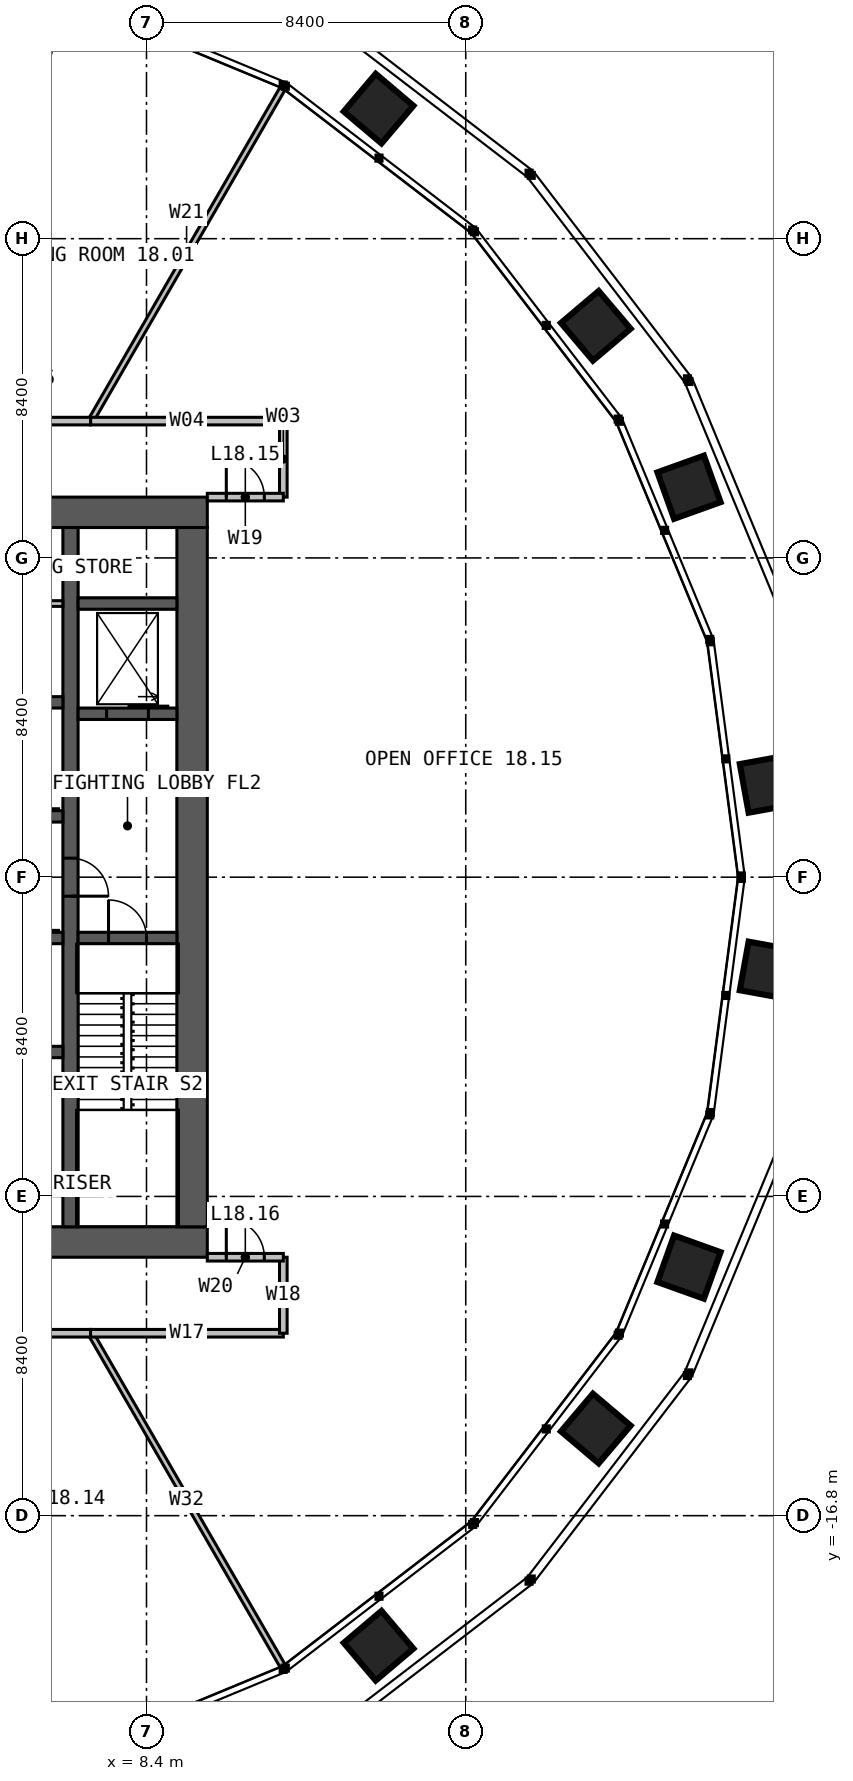
"""IFC4 building model, lengths in metres.
Left out: names, types, materials, properties, quantities, classifications, styles, units other than length and angle.
Written with IfcOpenShell. Run it as: python <this file> out.ifc"""

import sys

from ifc_helpers import new_model, si_unit, direction, frame, frame_2d, origin, place, context, subcontext, project, spatial, rectangle, extrude, element, fill, save


model = new_model("IFC4")
c1 = context("Model", 3, precision=1e-05, world=origin(), true_north=direction((0.0, 1.0)))
c2 = subcontext(c1, "Body", "Model", "MODEL_VIEW")
j1 = project(units=[si_unit("LENGTHUNIT", "METRE"), si_unit("PLANEANGLEUNIT", "RADIAN")], contexts=[c1])
p1 = place(None, origin())
s1 = spatial("IfcSite", under=j1, at=p1, CompositionType="ELEMENT")
p2 = place(p1, origin())
s2 = spatial("IfcBuilding", under=s1, at=p2, CompositionType="ELEMENT")
p3 = place(p2, frame((0.0, 0.0, 77.0)))
s3 = spatial("IfcBuildingStorey", under=s2, at=p3, CompositionType="ELEMENT", Elevation=77.0)
p4 = place(p3, frame((-10.0, 9.6, 0.0), z_axis=(0.0, 0.0, 1.0), x_axis=(1.0, 0.0, 0.0)))
e1 = element("IfcWall", 1, at=p4, inside=s3, PredefinedType="SOLIDWALL", context=c2, shape_type="SweptSolid", body=[
    extrude(rectangle(XDim=20.0, YDim=0.8, at=frame_2d((10.0, 0.0))), origin(), (0.0, 0.0, 1.0), 4.0),
])
p5 = place(p4, frame((9.4, 0.0, 0.0)))
e2 = element("IfcOpeningElement", 2, at=p5, cuts=e1, PredefinedType="OPENING", context=c2, shape_type="SweptSolid", body=[
    extrude(rectangle(XDim=1.2, YDim=2.2, at=frame_2d((0.6, 1.1))), frame((0.0, 0.41, 0.0), z_axis=(0.0, -1.0, 0.0), x_axis=(1.0, 0.0, 0.0)), (0.0, 0.0, 1.0), 0.82),
])
p6 = place(p3, frame((10.0, -9.6, 0.0), z_axis=(0.0, 0.0, 1.0), x_axis=(-1.0, 0.0, 0.0)))
e3 = element("IfcWall", 3, at=p6, inside=s3, PredefinedType="SOLIDWALL", context=c2, shape_type="SweptSolid", body=[
    extrude(rectangle(XDim=20.0, YDim=0.8, at=frame_2d((10.0, 0.0))), origin(), (0.0, 0.0, 1.0), 4.0),
])
p7 = place(p6, frame((6.875, 0.0, 0.0)))
e4 = element("IfcOpeningElement", 4, at=p7, cuts=e3, PredefinedType="OPENING", context=c2, shape_type="SweptSolid", body=[
    extrude(rectangle(XDim=1.2, YDim=2.2, at=frame_2d((0.6, 1.1))), frame((0.0, 0.41, 0.0), z_axis=(0.0, -1.0, 0.0), x_axis=(1.0, 0.0, 0.0)), (0.0, 0.0, 1.0), 0.82),
])
p8 = place(p3, frame((9.6, -9.2, 0.0), z_axis=(0.0, 0.0, 1.0), x_axis=(0.0, 1.0, 0.0)))
e5 = element("IfcWall", 5, at=p8, inside=s3, PredefinedType="SOLIDWALL", context=c2, shape_type="SweptSolid", body=[
    extrude(rectangle(XDim=18.4, YDim=0.8, at=frame_2d((9.2, 0.0))), origin(), (0.0, 0.0, 1.0), 4.0),
])
p9 = place(p3, frame((6.4, 9.2, 0.0), z_axis=(0.0, 0.0, 1.0), x_axis=(0.0, -1.0, 0.0)))
e6 = element("IfcWall", 6, at=p9, inside=s3, PredefinedType="SOLIDWALL", context=c2, shape_type="SweptSolid", body=[
    extrude(rectangle(XDim=18.4, YDim=0.4, at=frame_2d((9.2, 0.0))), origin(), (0.0, 0.0, 1.0), 4.0),
])
p10 = place(p9, frame((8.7, 0.0, 0.0)))
e7 = element("IfcOpeningElement", 7, at=p10, cuts=e6, PredefinedType="OPENING", context=c2, shape_type="SweptSolid", body=[
    extrude(rectangle(XDim=1.0, YDim=2.2, at=frame_2d((0.5, 1.1))), frame((0.0, 0.21, 0.0), z_axis=(0.0, -1.0, 0.0), x_axis=(1.0, 0.0, 0.0)), (0.0, 0.0, 1.0), 0.42),
])
p11 = place(p3, frame((1.35, 1.6, 0.0), z_axis=(0.0, 0.0, 1.0), x_axis=(1.0, 0.0, 0.0)))
e8 = element("IfcWall", 8, at=p11, inside=s3, PredefinedType="SOLIDWALL", context=c2, shape_type="SweptSolid", body=[
    extrude(rectangle(XDim=4.85, YDim=0.3, at=frame_2d((2.425, 0.0))), origin(), (0.0, 0.0, 1.0), 4.0),
])
p12 = place(p11, frame((0.6, 0.0, 0.0)))
e9 = element("IfcOpeningElement", 9, at=p12, cuts=e8, PredefinedType="OPENING", context=c2, shape_type="SweptSolid", body=[
    extrude(rectangle(XDim=1.1, YDim=2.2, at=frame_2d((0.55, 1.1))), frame((0.0, 0.16, 0.0), z_axis=(0.0, -1.0, 0.0), x_axis=(1.0, 0.0, 0.0)), (0.0, 0.0, 1.0), 0.32),
])
p13 = place(p11, frame((3.125, 0.0, 0.0)))
e10 = element("IfcOpeningElement", 10, at=p13, cuts=e8, PredefinedType="OPENING", context=c2, shape_type="SweptSolid", body=[
    extrude(rectangle(XDim=1.1, YDim=2.2, at=frame_2d((0.55, 1.1))), frame((0.0, 0.16, 0.0), z_axis=(0.0, -1.0, 0.0), x_axis=(1.0, 0.0, 0.0)), (0.0, 0.0, 1.0), 0.32),
])
p14 = place(p3, frame((1.35, 4.6, 0.0), z_axis=(0.0, 0.0, 1.0), x_axis=(1.0, 0.0, 0.0)))
e11 = element("IfcWall", 11, at=p14, inside=s3, PredefinedType="SOLIDWALL", context=c2, shape_type="SweptSolid", body=[
    extrude(rectangle(XDim=4.85, YDim=0.3, at=frame_2d((2.425, 0.0))), origin(), (0.0, 0.0, 1.0), 4.0),
])
p15 = place(p3, frame((3.85, -1.6, 0.0), z_axis=(0.0, 0.0, 1.0), x_axis=(1.0, 0.0, 0.0)))
e12 = element("IfcWall", 12, at=p15, inside=s3, PredefinedType="SOLIDWALL", context=c2, shape_type="SweptSolid", body=[
    extrude(rectangle(XDim=2.35, YDim=0.3, at=frame_2d((1.175, 0.0))), origin(), (0.0, 0.0, 1.0), 4.0),
])
p16 = place(p15, frame((0.625, 0.0, 0.0)))
e13 = element("IfcOpeningElement", 13, at=p16, cuts=e12, PredefinedType="OPENING", context=c2, shape_type="SweptSolid", body=[
    extrude(rectangle(XDim=1.1, YDim=2.2, at=frame_2d((0.55, 1.1))), frame((0.0, 0.16, 0.0), z_axis=(0.0, -1.0, 0.0), x_axis=(1.0, 0.0, 0.0)), (0.0, 0.0, 1.0), 0.32),
])
p17 = place(p3, frame((3.85, -4.6, 0.0), z_axis=(0.0, 0.0, 1.0), x_axis=(1.0, 0.0, 0.0)))
e14 = element("IfcWall", 14, at=p17, inside=s3, PredefinedType="SOLIDWALL", context=c2, shape_type="SweptSolid", body=[
    extrude(rectangle(XDim=2.35, YDim=0.3, at=frame_2d((1.175, 0.0))), origin(), (0.0, 0.0, 1.0), 4.0),
])
p18 = place(p3, frame((6.6, -1.6, 0.0), z_axis=(0.0, 0.0, 1.0), x_axis=(1.0, 0.0, 0.0)))
e15 = element("IfcWall", 15, at=p18, inside=s3, PredefinedType="SOLIDWALL", context=c2, shape_type="SweptSolid", body=[
    extrude(rectangle(XDim=2.6, YDim=0.3, at=frame_2d((1.3, 0.0))), origin(), (0.0, 0.0, 1.0), 4.0),
])
p19 = place(p18, frame((0.8, 0.0, 0.0)))
e16 = element("IfcOpeningElement", 16, at=p19, cuts=e15, PredefinedType="OPENING", context=c2, shape_type="SweptSolid", body=[
    extrude(rectangle(XDim=1.0, YDim=2.2, at=frame_2d((0.5, 1.1))), frame((0.0, 0.16, 0.0), z_axis=(0.0, -1.0, 0.0), x_axis=(1.0, 0.0, 0.0)), (0.0, 0.0, 1.0), 0.32),
])
p20 = place(p3, frame((6.6, 4.3, 0.0), z_axis=(0.0, 0.0, 1.0), x_axis=(1.0, 0.0, 0.0)))
e17 = element("IfcWall", 17, at=p20, inside=s3, PredefinedType="SOLIDWALL", context=c2, shape_type="SweptSolid", body=[
    extrude(rectangle(XDim=2.6, YDim=0.3, at=frame_2d((1.3, 0.0))), origin(), (0.0, 0.0, 1.0), 4.0),
])
p21 = place(p20, frame((0.75, 0.0, 0.0)))
e18 = element("IfcOpeningElement", 18, at=p21, cuts=e17, PredefinedType="OPENING", context=c2, shape_type="SweptSolid", body=[
    extrude(rectangle(XDim=1.1, YDim=2.2, at=frame_2d((0.55, 1.1))), frame((0.0, 0.16, 0.0), z_axis=(0.0, -1.0, 0.0), x_axis=(1.0, 0.0, 0.0)), (0.0, 0.0, 1.0), 0.32),
])
p22 = place(p3, frame((6.6, 7.2, 0.0), z_axis=(0.0, 0.0, 1.0), x_axis=(1.0, 0.0, 0.0)))
e19 = element("IfcWall", 19, at=p22, inside=s3, PredefinedType="SOLIDWALL", context=c2, shape_type="SweptSolid", body=[
    extrude(rectangle(XDim=2.6, YDim=0.3, at=frame_2d((1.3, 0.0))), origin(), (0.0, 0.0, 1.0), 4.0),
])
p23 = place(p3, frame((1.35, 7.2, 0.0), z_axis=(0.0, 0.0, 1.0), x_axis=(1.0, 0.0, 0.0)))
e20 = element("IfcWall", 20, at=p23, inside=s3, PredefinedType="PARTITIONING", context=c2, shape_type="SweptSolid", body=[
    extrude(rectangle(XDim=4.85, YDim=0.15, at=frame_2d((2.425, 0.0))), origin(), (0.0, 0.0, 1.0), 3.75),
])
p24 = place(p23, frame((3.45, 0.0, 0.0)))
e21 = element("IfcOpeningElement", 21, at=p24, cuts=e20, PredefinedType="OPENING", context=c2, shape_type="SweptSolid", body=[
    extrude(rectangle(XDim=0.9, YDim=2.2, at=frame_2d((0.45, 1.1))), frame((0.0, 0.085, 0.0), z_axis=(0.0, -1.0, 0.0), x_axis=(1.0, 0.0, 0.0)), (0.0, 0.0, 1.0), 0.17),
])
p25 = place(p3, frame((6.928, 12.0, 0.0), z_axis=(0.0, 0.0, 1.0), x_axis=(0.500002673408, 0.866023860286, 0.0)))
e22 = element("IfcWall", 22, at=p25, inside=s3, PredefinedType="PARTITIONING", context=c2, shape_type="SweptSolid", body=[
    extrude(rectangle(XDim=10.106, YDim=0.15, at=frame_2d((5.053, 0.0))), origin(), (0.0, 0.0, 1.0), 2.79),
])
p26 = place(p3, frame((3.215, 12.0, 0.0), z_axis=(0.0, 0.0, 1.0), x_axis=(0.258825273624, 0.96592415734, 0.0)))
e23 = element("IfcWall", 23, at=p26, inside=s3, PredefinedType="PARTITIONING", context=c2, shape_type="SweptSolid", body=[
    extrude(rectangle(XDim=11.539, YDim=0.15, at=frame_2d((5.77, 0.0))), origin(), (0.0, 0.0, 1.0), 2.79),
])
p27 = place(p3, frame((6.928, -12.0, 0.0), z_axis=(0.0, 0.0, 1.0), x_axis=(0.500002673408, -0.866023860286, 0.0)))
e24 = element("IfcWall", 24, at=p27, inside=s3, PredefinedType="PARTITIONING", context=c2, shape_type="SweptSolid", body=[
    extrude(rectangle(XDim=10.106, YDim=0.15, at=frame_2d((5.053, 0.0))), origin(), (0.0, 0.0, 1.0), 2.79),
])
p28 = place(p3, frame((12.0, 10.0, 0.0), z_axis=(0.0, 0.0, 1.0), x_axis=(0.0, 1.0, 0.0)))
e25 = element("IfcWall", 25, at=p28, inside=s3, PredefinedType="PARTITIONING", context=c2, shape_type="SweptSolid", body=[
    extrude(rectangle(XDim=2.0, YDim=0.2, at=frame_2d((1.0, 0.0))), origin(), (0.0, 0.0, 1.0), 3.8),
])
p29 = place(p3, frame((12.0, 12.0, 0.0), z_axis=(0.0, 0.0, 1.0), x_axis=(-1.0, 0.0, 0.0)))
e26 = element("IfcWall", 26, at=p29, inside=s3, PredefinedType="PARTITIONING", context=c2, shape_type="SweptSolid", body=[
    extrude(rectangle(XDim=5.072, YDim=0.2, at=frame_2d((2.536, 0.0))), origin(), (0.0, 0.0, 1.0), 3.8),
])
p30 = place(p3, frame((6.928, 12.0, 0.0), z_axis=(0.0, 0.0, 1.0), x_axis=(-1.0, 0.0, 0.0)))
e27 = element("IfcWall", 27, at=p30, inside=s3, PredefinedType="PARTITIONING", context=c2, shape_type="SweptSolid", body=[
    extrude(rectangle(XDim=3.713, YDim=0.2, at=frame_2d((1.856, 0.0))), origin(), (0.0, 0.0, 1.0), 3.8),
])
p31 = place(p30, frame((1.356, 0.0, 0.0)))
e28 = element("IfcOpeningElement", 28, at=p31, cuts=e27, PredefinedType="OPENING", context=c2, shape_type="SweptSolid", body=[
    extrude(rectangle(XDim=1.0, YDim=2.2, at=frame_2d((0.5, 1.1))), frame((0.0, 0.11, 0.0), z_axis=(0.0, -1.0, 0.0), x_axis=(1.0, 0.0, 0.0)), (0.0, 0.0, 1.0), 0.22),
])
p32 = place(p3, frame((0.0, -12.0, 0.0), z_axis=(0.0, 0.0, 1.0), x_axis=(1.0, 0.0, 0.0)))
e29 = element("IfcWall", 29, at=p32, inside=s3, PredefinedType="PARTITIONING", context=c2, shape_type="SweptSolid", body=[
    extrude(rectangle(XDim=6.928, YDim=0.2, at=frame_2d((3.464, 0.0))), origin(), (0.0, 0.0, 1.0), 3.8),
])
p33 = place(p32, frame((2.564, 0.0, 0.0)))
e30 = element("IfcOpeningElement", 30, at=p33, cuts=e29, PredefinedType="OPENING", context=c2, shape_type="SweptSolid", body=[
    extrude(rectangle(XDim=1.8, YDim=2.2, at=frame_2d((0.9, 1.1))), frame((0.0, 0.11, 0.0), z_axis=(0.0, -1.0, 0.0), x_axis=(1.0, 0.0, 0.0)), (0.0, 0.0, 1.0), 0.22),
])
p34 = place(p3, frame((6.928, -12.0, 0.0), z_axis=(0.0, 0.0, 1.0), x_axis=(1.0, 0.0, 0.0)))
e31 = element("IfcWall", 31, at=p34, inside=s3, PredefinedType="PARTITIONING", context=c2, shape_type="SweptSolid", body=[
    extrude(rectangle(XDim=5.072, YDim=0.2, at=frame_2d((2.536, 0.0))), origin(), (0.0, 0.0, 1.0), 3.8),
])
p35 = place(p3, frame((12.0, -12.0, 0.0), z_axis=(0.0, 0.0, 1.0), x_axis=(0.0, 1.0, 0.0)))
e32 = element("IfcWall", 32, at=p35, inside=s3, PredefinedType="PARTITIONING", context=c2, shape_type="SweptSolid", body=[
    extrude(rectangle(XDim=2.0, YDim=0.2, at=frame_2d((1.0, 0.0))), origin(), (0.0, 0.0, 1.0), 3.8),
])
p36 = place(p3, frame((10.0, 10.0, 0.0), z_axis=(0.0, 0.0, 1.0), x_axis=(1.0, 0.0, 0.0)))
e33 = element("IfcWall", 33, at=p36, inside=s3, PredefinedType="PARTITIONING", context=c2, shape_type="SweptSolid", body=[
    extrude(rectangle(XDim=2.0, YDim=0.2, at=frame_2d((1.0, 0.0))), origin(), (0.0, 0.0, 1.0), 3.8),
])
p37 = place(p36, frame((0.5, 0.0, 0.0)))
e34 = element("IfcOpeningElement", 34, at=p37, cuts=e33, PredefinedType="OPENING", context=c2, shape_type="SweptSolid", body=[
    extrude(rectangle(XDim=1.0, YDim=2.2, at=frame_2d((0.5, 1.1))), frame((0.0, 0.11, 0.0), z_axis=(0.0, -1.0, 0.0), x_axis=(1.0, 0.0, 0.0)), (0.0, 0.0, 1.0), 0.22),
])
p38 = place(p3, frame((10.0, -10.0, 0.0), z_axis=(0.0, 0.0, 1.0), x_axis=(1.0, 0.0, 0.0)))
e35 = element("IfcWall", 35, at=p38, inside=s3, PredefinedType="PARTITIONING", context=c2, shape_type="SweptSolid", body=[
    extrude(rectangle(XDim=2.0, YDim=0.2, at=frame_2d((1.0, 0.0))), origin(), (0.0, 0.0, 1.0), 3.8),
])
p39 = place(p38, frame((0.5, 0.0, 0.0)))
e36 = element("IfcOpeningElement", 36, at=p39, cuts=e35, PredefinedType="OPENING", context=c2, shape_type="SweptSolid", body=[
    extrude(rectangle(XDim=1.0, YDim=2.2, at=frame_2d((0.5, 1.1))), frame((0.0, 0.11, 0.0), z_axis=(0.0, -1.0, 0.0), x_axis=(1.0, 0.0, 0.0)), (0.0, 0.0, 1.0), 0.22),
])
p40 = place(p10, origin())
e37 = element("IfcDoor", 37, at=p40, inside=s3, OperationType="SINGLE_SWING_RIGHT", PredefinedType="DOOR", context=c2, shape_type="SweptSolid", body=[
    extrude(rectangle(XDim=1.0, YDim=2.2, at=frame_2d((0.5, 1.1))), frame((0.0, 0.025, 0.0), z_axis=(0.0, -1.0, 0.0), x_axis=(1.0, 0.0, 0.0)), (0.0, 0.0, 1.0), 0.05),
])
fill(e7, e37)
p41 = place(p19, origin())
e38 = element("IfcDoor", 38, at=p41, inside=s3, OperationType="SINGLE_SWING_LEFT", PredefinedType="DOOR", context=c2, shape_type="SweptSolid", body=[
    extrude(rectangle(XDim=1.0, YDim=2.2, at=frame_2d((0.5, 1.1))), frame((0.0, 0.025, 0.0), z_axis=(0.0, -1.0, 0.0), x_axis=(1.0, 0.0, 0.0)), (0.0, 0.0, 1.0), 0.05),
])
fill(e16, e38)
p42 = place(p21, origin())
e39 = element("IfcDoor", 39, at=p42, inside=s3, OperationType="SLIDING_TO_LEFT", PredefinedType="DOOR", context=c2, shape_type="SweptSolid", body=[
    extrude(rectangle(XDim=1.1, YDim=2.2, at=frame_2d((0.55, 1.1))), frame((0.0, 0.025, 0.0), z_axis=(0.0, -1.0, 0.0), x_axis=(1.0, 0.0, 0.0)), (0.0, 0.0, 1.0), 0.05),
])
fill(e18, e39)
p43 = place(p37, origin())
e40 = element("IfcDoor", 40, at=p43, inside=s3, OperationType="SINGLE_SWING_LEFT", PredefinedType="DOOR", context=c2, shape_type="SweptSolid", body=[
    extrude(rectangle(XDim=1.0, YDim=2.2, at=frame_2d((0.5, 1.1))), frame((0.0, 0.025, 0.0), z_axis=(0.0, -1.0, 0.0), x_axis=(1.0, 0.0, 0.0)), (0.0, 0.0, 1.0), 0.05),
])
fill(e34, e40)
p44 = place(p39, origin())
e41 = element("IfcDoor", 41, at=p44, inside=s3, OperationType="SINGLE_SWING_LEFT", PredefinedType="DOOR", context=c2, shape_type="SweptSolid", body=[
    extrude(rectangle(XDim=1.0, YDim=2.2, at=frame_2d((0.5, 1.1))), frame((0.0, 0.025, 0.0), z_axis=(0.0, -1.0, 0.0), x_axis=(1.0, 0.0, 0.0)), (0.0, 0.0, 1.0), 0.05),
])
fill(e36, e41)
save(model, sys.argv[1])
